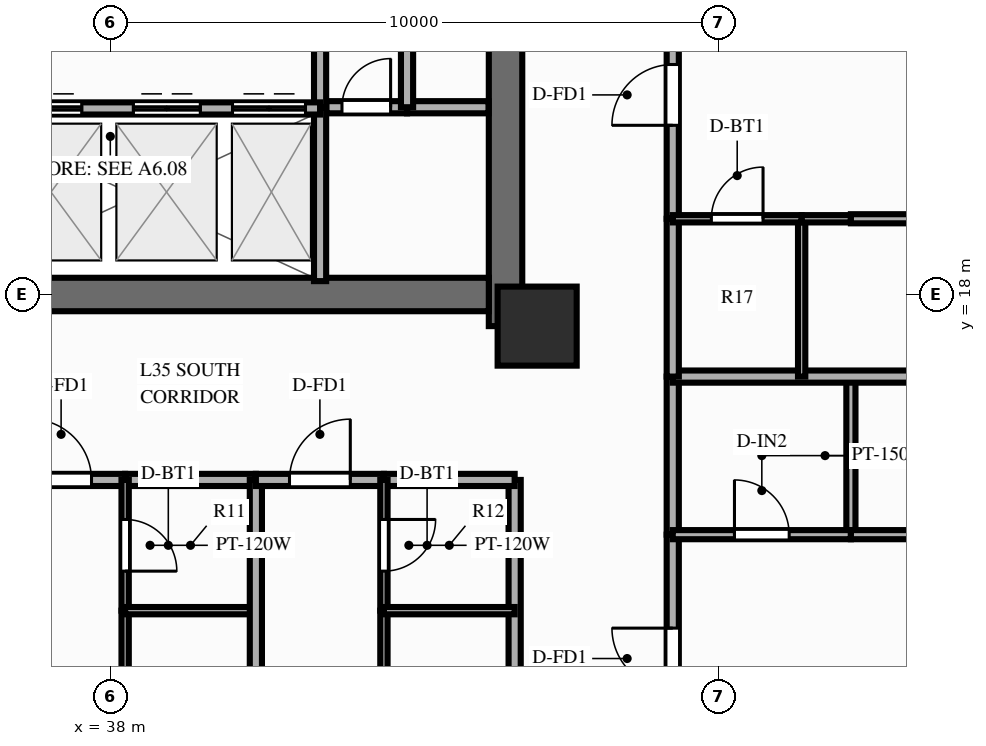
"""IFC4 building model, lengths in metres.
Left out: names, types, materials, properties, quantities, classifications, styles, units other than length and angle.
Written with IfcOpenShell. Run it as: python <this file> out.ifc"""

import sys

from ifc_helpers import new_model, si_unit, direction, frame, frame_2d, origin, origin_2d, place, context, subcontext, project, spatial, rectangle, extrude, source, transform, mapped, element, fill, save


model = new_model("IFC4")
c1 = context("Model", 3, precision=1e-05, world=origin(), true_north=direction((0.0, 1.0)))
c2 = subcontext(c1, "Body", "Model", "MODEL_VIEW")
j1 = project(units=[si_unit("LENGTHUNIT", "METRE"), si_unit("PLANEANGLEUNIT", "RADIAN")], contexts=[c1])
p1 = place(None, origin())
s1 = spatial("IfcSite", under=j1, at=p1, CompositionType="ELEMENT")
p2 = place(p1, origin())
s2 = spatial("IfcBuilding", under=s1, at=p2, CompositionType="ELEMENT")
p3 = place(p2, frame((0.0, 0.0, 110.85)))
s3 = spatial("IfcBuildingStorey", under=s2, at=p3, CompositionType="ELEMENT", Elevation=110.85)
p4 = place(p3, frame((44.5, 17.48, 0.0), z_axis=(0.0, 0.0, 1.0), x_axis=(0.0, 1.0, 0.0)))
e1 = element("IfcWall", 1, at=p4, inside=s3, PredefinedType="SHEAR", context=c2, shape_type="SweptSolid", body=[
    extrude(rectangle(XDim=19.04, YDim=0.55, at=frame_2d((9.52, 0.0))), origin(), (0.0, 0.0, 1.0), 3.0),
])
p5 = place(p4, frame((12.67, 0.0, 0.0), z_axis=(0.0, 0.0, 1.0), x_axis=(-1.0, 0.0, 0.0)))
e2 = element("IfcOpeningElement", 2, at=p5, cuts=e1, PredefinedType="OPENING", context=c2, shape_type="SweptSolid", body=[
    extrude(rectangle(XDim=1.1, YDim=2.15, at=frame_2d((0.55, 1.075))), frame((0.0, 0.287, 0.0), z_axis=(0.0, -1.0, 0.0), x_axis=(1.0, 0.0, 0.0)), (0.0, 0.0, 1.0), 0.574),
])
p6 = place(p3, frame((31.775, 18.0, 0.0), z_axis=(0.0, 0.0, 1.0), x_axis=(1.0, 0.0, 0.0)))
e3 = element("IfcWall", 3, at=p6, inside=s3, PredefinedType="SHEAR", context=c2, shape_type="SweptSolid", body=[
    extrude(rectangle(XDim=12.45, YDim=0.55, at=frame_2d((6.225, 0.0))), origin(), (0.0, 0.0, 1.0), 3.0),
])
m1 = source(origin(), c2, "Body", "SweptSolid", [
    extrude(rectangle(XDim=1.3, YDim=1.3, at=origin_2d()), origin(), (0.0, 0.0, 1.0), 3.0),
])
p7 = place(p3, frame((45.02, 17.48, 0.0), z_axis=(0.0, 0.0, 1.0), x_axis=(1.0, 0.0, 0.0)))
e4 = element("IfcColumn", 4, at=p7, inside=s3, PredefinedType="COLUMN", context=c2, shape_type="MappedRepresentation", body=[
    mapped(m1, transform((0.0, 0.0, 0.0), scale=1.0)),
])
p8 = place(p3, frame((41.55, 21.08, 0.0), z_axis=(0.0, 0.0, 1.0), x_axis=(1.0, 0.0, 0.0)))
e5 = element("IfcWall", 5, at=p8, inside=s3, PredefinedType="PARTITIONING", context=c2, shape_type="SweptSolid", body=[
    extrude(rectangle(XDim=1.33, YDim=0.2, at=frame_2d((0.665, 0.0))), origin(), (0.0, 0.0, 1.0), 2.79),
])
p9 = place(p8, frame((0.26, 0.0, 0.0)))
e6 = element("IfcOpeningElement", 6, at=p9, cuts=e5, PredefinedType="OPENING", context=c2, shape_type="SweptSolid", body=[
    extrude(rectangle(XDim=0.8, YDim=2.05, at=frame_2d((0.4, 1.025))), frame((0.0, 0.112, 0.0), z_axis=(0.0, -1.0, 0.0), x_axis=(1.0, 0.0, 0.0)), (0.0, 0.0, 1.0), 0.224),
])
p10 = place(p3, frame((42.88, 21.08, 0.0), z_axis=(0.0, 0.0, 1.0), x_axis=(1.0, 0.0, 0.0)))
e7 = element("IfcWall", 7, at=p10, inside=s3, PredefinedType="PARTITIONING", context=c2, shape_type="SweptSolid", body=[
    extrude(rectangle(XDim=1.34, YDim=0.2, at=frame_2d((0.67, 0.0))), origin(), (0.0, 0.0, 1.0), 2.79),
])
p11 = place(p3, frame((42.88, 21.08, 0.0), z_axis=(0.0, 0.0, 1.0), x_axis=(0.0, 1.0, 0.0)))
e8 = element("IfcWall", 8, at=p11, inside=s3, PredefinedType="PARTITIONING", context=c2, shape_type="SweptSolid", body=[
    extrude(rectangle(XDim=7.47, YDim=0.2, at=frame_2d((3.735, 0.0))), origin(), (0.0, 0.0, 1.0), 2.79),
])
p12 = place(p11, frame((3.2, 0.0, 0.0)))
e9 = element("IfcOpeningElement", 9, at=p12, cuts=e8, PredefinedType="OPENING", context=c2, shape_type="SweptSolid", body=[
    extrude(rectangle(XDim=0.9, YDim=2.1, at=frame_2d((0.45, 1.05))), frame((0.0, 0.112, 0.0), z_axis=(0.0, -1.0, 0.0), x_axis=(1.0, 0.0, 0.0)), (0.0, 0.0, 1.0), 0.224),
])
p13 = place(p3, frame((41.45, 18.22, 0.0), z_axis=(0.0, 0.0, 1.0), x_axis=(0.0, 1.0, 0.0)))
e10 = element("IfcWall", 10, at=p13, inside=s3, PredefinedType="PARTITIONING", context=c2, shape_type="SweptSolid", body=[
    extrude(rectangle(XDim=2.86, YDim=0.2, at=frame_2d((1.43, 0.0))), origin(), (0.0, 0.0, 1.0), 2.79),
])
p14 = place(p3, frame((41.45, 21.08, 0.0), z_axis=(0.0, 0.0, 1.0), x_axis=(0.0, 1.0, 0.0)))
e11 = element("IfcWall", 11, at=p14, inside=s3, PredefinedType="PARTITIONING", context=c2, shape_type="SweptSolid", body=[
    extrude(rectangle(XDim=7.52, YDim=0.2, at=frame_2d((3.76, 0.0))), origin(), (0.0, 0.0, 1.0), 2.79),
])
p15 = place(p14, frame((2.8, 0.0, 0.0)))
e12 = element("IfcOpeningElement", 12, at=p15, cuts=e11, PredefinedType="OPENING", context=c2, shape_type="SweptSolid", body=[
    extrude(rectangle(XDim=0.9, YDim=2.1, at=frame_2d((0.45, 1.05))), frame((0.0, 0.112, 0.0), z_axis=(0.0, -1.0, 0.0), x_axis=(1.0, 0.0, 0.0)), (0.0, 0.0, 1.0), 0.224),
])
p16 = place(p3, frame((35.43, 21.06, 0.0), z_axis=(0.0, 0.0, 1.0), x_axis=(1.0, 0.0, 0.0)))
e13 = element("IfcWall", 13, at=p16, inside=s3, PredefinedType="PARTITIONING", context=c2, shape_type="SweptSolid", body=[
    extrude(rectangle(XDim=6.02, YDim=0.2, at=frame_2d((3.01, 0.0))), origin(), (0.0, 0.0, 1.0), 2.79),
])
p17 = place(p16, frame((1.0, 0.0, 0.0)))
e14 = element("IfcOpeningElement", 14, at=p17, cuts=e13, PredefinedType="OPENING", context=c2, shape_type="SweptSolid", body=[
    extrude(rectangle(XDim=1.1, YDim=2.15, at=frame_2d((0.55, 1.075))), frame((0.0, 0.112, 0.0), z_axis=(0.0, -1.0, 0.0), x_axis=(1.0, 0.0, 0.0)), (0.0, 0.0, 1.0), 0.224),
])
p18 = place(p16, frame((2.95, 0.0, 0.0)))
e15 = element("IfcOpeningElement", 15, at=p18, cuts=e13, PredefinedType="OPENING", context=c2, shape_type="SweptSolid", body=[
    extrude(rectangle(XDim=1.1, YDim=2.15, at=frame_2d((0.55, 1.075))), frame((0.0, 0.112, 0.0), z_axis=(0.0, -1.0, 0.0), x_axis=(1.0, 0.0, 0.0)), (0.0, 0.0, 1.0), 0.224),
])
p19 = place(p16, frame((4.58, 0.0, 0.0)))
e16 = element("IfcOpeningElement", 16, at=p19, cuts=e13, PredefinedType="OPENING", context=c2, shape_type="SweptSolid", body=[
    extrude(rectangle(XDim=1.2, YDim=2.15, at=frame_2d((0.6, 1.075))), frame((0.0, 0.112, 0.0), z_axis=(0.0, -1.0, 0.0), x_axis=(1.0, 0.0, 0.0)), (0.0, 0.0, 1.0), 0.224),
])
p20 = place(p3, frame((44.65, 14.95, 0.0), z_axis=(0.0, 0.0, 1.0), x_axis=(0.0, -1.0, 0.0)))
e17 = element("IfcWall", 17, at=p20, inside=s3, PredefinedType="PARTITIONING", context=c2, shape_type="SweptSolid", body=[
    extrude(rectangle(XDim=11.8, YDim=0.2, at=frame_2d((5.9, 0.0))), origin(), (0.0, 0.0, 1.0), 2.34),
])
p21 = place(p3, frame((36.138, 14.95, 0.0), z_axis=(0.0, 0.0, 1.0), x_axis=(1.0, 0.0, 0.0)))
e18 = element("IfcWall", 18, at=p21, inside=s3, PredefinedType="PARTITIONING", context=c2, shape_type="SweptSolid", body=[
    extrude(rectangle(XDim=2.106, YDim=0.2, at=frame_2d((1.053, 0.0))), origin(), (0.0, 0.0, 1.0), 2.79),
])
p22 = place(p21, frame((0.553, 0.0, 0.0)))
e19 = element("IfcOpeningElement", 19, at=p22, cuts=e18, PredefinedType="OPENING", context=c2, shape_type="SweptSolid", body=[
    extrude(rectangle(XDim=1.0, YDim=2.15, at=frame_2d((0.5, 1.075))), frame((0.0, 0.112, 0.0), z_axis=(0.0, -1.0, 0.0), x_axis=(1.0, 0.0, 0.0)), (0.0, 0.0, 1.0), 0.224),
])
p23 = place(p3, frame((38.244, 14.95, 0.0), z_axis=(0.0, 0.0, 1.0), x_axis=(1.0, 0.0, 0.0)))
e20 = element("IfcWall", 20, at=p23, inside=s3, PredefinedType="PARTITIONING", context=c2, shape_type="SweptSolid", body=[
    extrude(rectangle(XDim=2.15, YDim=0.2, at=frame_2d((1.075, 0.0))), origin(), (0.0, 0.0, 1.0), 2.79),
])
p24 = place(p3, frame((38.244, 14.95, 0.0), z_axis=(0.0, 0.0, 1.0), x_axis=(0.0, -1.0, 0.0)))
e21 = element("IfcWall", 21, at=p24, inside=s3, PredefinedType="PARTITIONING", context=c2, shape_type="SweptSolid", body=[
    extrude(rectangle(XDim=2.15, YDim=0.12, at=frame_2d((1.075, 0.0))), origin(), (0.0, 0.0, 1.0), 2.79),
])
p25 = place(p24, frame((0.65, 0.0, 0.0)))
e22 = element("IfcOpeningElement", 22, at=p25, cuts=e21, PredefinedType="OPENING", context=c2, shape_type="SweptSolid", body=[
    extrude(rectangle(XDim=0.85, YDim=2.05, at=frame_2d((0.425, 1.025))), frame((0.0, 0.072, 0.0), z_axis=(0.0, -1.0, 0.0), x_axis=(1.0, 0.0, 0.0)), (0.0, 0.0, 1.0), 0.144),
])
p26 = place(p3, frame((38.244, 12.8, 0.0), z_axis=(0.0, 0.0, 1.0), x_axis=(0.0, -1.0, 0.0)))
e23 = element("IfcWall", 23, at=p26, inside=s3, PredefinedType="PARTITIONING", context=c2, shape_type="SweptSolid", body=[
    extrude(rectangle(XDim=1.02, YDim=0.12, at=frame_2d((0.51, 0.0))), origin(), (0.0, 0.0, 1.0), 2.79),
])
p27 = place(p3, frame((38.244, 12.8, 0.0), z_axis=(0.0, 0.0, 1.0), x_axis=(1.0, 0.0, 0.0)))
e24 = element("IfcWall", 24, at=p27, inside=s3, PredefinedType="PARTITIONING", context=c2, shape_type="SweptSolid", body=[
    extrude(rectangle(XDim=2.15, YDim=0.12, at=frame_2d((1.075, 0.0))), origin(), (0.0, 0.0, 1.0), 2.79),
])
p28 = place(p3, frame((40.394, 14.95, 0.0), z_axis=(0.0, 0.0, 1.0), x_axis=(0.0, -1.0, 0.0)))
e25 = element("IfcWall", 25, at=p28, inside=s3, PredefinedType="PARTITIONING", context=c2, shape_type="SweptSolid", body=[
    extrude(rectangle(XDim=11.8, YDim=0.2, at=frame_2d((5.9, 0.0))), origin(), (0.0, 0.0, 1.0), 2.79),
])
p29 = place(p3, frame((40.394, 14.95, 0.0), z_axis=(0.0, 0.0, 1.0), x_axis=(1.0, 0.0, 0.0)))
e26 = element("IfcWall", 26, at=p29, inside=s3, PredefinedType="PARTITIONING", context=c2, shape_type="SweptSolid", body=[
    extrude(rectangle(XDim=2.106, YDim=0.2, at=frame_2d((1.053, 0.0))), origin(), (0.0, 0.0, 1.0), 2.79),
])
p30 = place(p29, frame((0.553, 0.0, 0.0)))
e27 = element("IfcOpeningElement", 27, at=p30, cuts=e26, PredefinedType="OPENING", context=c2, shape_type="SweptSolid", body=[
    extrude(rectangle(XDim=1.0, YDim=2.15, at=frame_2d((0.5, 1.075))), frame((0.0, 0.112, 0.0), z_axis=(0.0, -1.0, 0.0), x_axis=(1.0, 0.0, 0.0)), (0.0, 0.0, 1.0), 0.224),
])
p31 = place(p3, frame((42.5, 14.95, 0.0), z_axis=(0.0, 0.0, 1.0), x_axis=(1.0, 0.0, 0.0)))
e28 = element("IfcWall", 28, at=p31, inside=s3, PredefinedType="PARTITIONING", context=c2, shape_type="SweptSolid", body=[
    extrude(rectangle(XDim=2.15, YDim=0.2, at=frame_2d((1.075, 0.0))), origin(), (0.0, 0.0, 1.0), 2.79),
])
p32 = place(p3, frame((42.5, 14.95, 0.0), z_axis=(0.0, 0.0, 1.0), x_axis=(0.0, -1.0, 0.0)))
e29 = element("IfcWall", 29, at=p32, inside=s3, PredefinedType="PARTITIONING", context=c2, shape_type="SweptSolid", body=[
    extrude(rectangle(XDim=2.15, YDim=0.12, at=frame_2d((1.075, 0.0))), origin(), (0.0, 0.0, 1.0), 2.79),
])
p33 = place(p32, frame((0.65, 0.0, 0.0)))
e30 = element("IfcOpeningElement", 30, at=p33, cuts=e29, PredefinedType="OPENING", context=c2, shape_type="SweptSolid", body=[
    extrude(rectangle(XDim=0.85, YDim=2.05, at=frame_2d((0.425, 1.025))), frame((0.0, 0.072, 0.0), z_axis=(0.0, -1.0, 0.0), x_axis=(1.0, 0.0, 0.0)), (0.0, 0.0, 1.0), 0.144),
])
p34 = place(p3, frame((42.5, 12.8, 0.0), z_axis=(0.0, 0.0, 1.0), x_axis=(0.0, -1.0, 0.0)))
e31 = element("IfcWall", 31, at=p34, inside=s3, PredefinedType="PARTITIONING", context=c2, shape_type="SweptSolid", body=[
    extrude(rectangle(XDim=1.02, YDim=0.12, at=frame_2d((0.51, 0.0))), origin(), (0.0, 0.0, 1.0), 2.79),
])
p35 = place(p3, frame((42.5, 12.8, 0.0), z_axis=(0.0, 0.0, 1.0), x_axis=(1.0, 0.0, 0.0)))
e32 = element("IfcWall", 32, at=p35, inside=s3, PredefinedType="PARTITIONING", context=c2, shape_type="SweptSolid", body=[
    extrude(rectangle(XDim=2.15, YDim=0.12, at=frame_2d((1.075, 0.0))), origin(), (0.0, 0.0, 1.0), 2.79),
])
p36 = place(p3, frame((47.25, 9.976, 0.0), z_axis=(0.0, 0.0, 1.0), x_axis=(0.0, 1.0, 0.0)))
e33 = element("IfcWall", 33, at=p36, inside=s3, PredefinedType="PARTITIONING", context=c2, shape_type="SweptSolid", body=[
    extrude(rectangle(XDim=4.074, YDim=0.2, at=frame_2d((2.037, 0.0))), origin(), (0.0, 0.0, 1.0), 2.79),
])
p37 = place(p36, frame((1.537, 0.0, 0.0)))
e34 = element("IfcOpeningElement", 34, at=p37, cuts=e33, PredefinedType="OPENING", context=c2, shape_type="SweptSolid", body=[
    extrude(rectangle(XDim=1.0, YDim=2.15, at=frame_2d((0.5, 1.075))), frame((0.0, 0.112, 0.0), z_axis=(0.0, -1.0, 0.0), x_axis=(1.0, 0.0, 0.0)), (0.0, 0.0, 1.0), 0.224),
])
p38 = place(p3, frame((47.25, 14.05, 0.0), z_axis=(0.0, 0.0, 1.0), x_axis=(0.0, 1.0, 0.0)))
e35 = element("IfcWall", 35, at=p38, inside=s3, PredefinedType="PARTITIONING", context=c2, shape_type="SweptSolid", body=[
    extrude(rectangle(XDim=2.6, YDim=0.2, at=frame_2d((1.3, 0.0))), origin(), (0.0, 0.0, 1.0), 2.79),
])
p39 = place(p3, frame((50.18, 14.05, 0.0), z_axis=(0.0, 0.0, 1.0), x_axis=(0.0, 1.0, 0.0)))
e36 = element("IfcWall", 36, at=p39, inside=s3, PredefinedType="PARTITIONING", context=c2, shape_type="SweptSolid", body=[
    extrude(rectangle(XDim=2.6, YDim=0.15, at=frame_2d((1.3, 0.0))), origin(), (0.0, 0.0, 1.0), 2.79),
])
p40 = place(p3, frame((47.25, 14.05, 0.0), z_axis=(0.0, 0.0, 1.0), x_axis=(1.0, 0.0, 0.0)))
e37 = element("IfcWall", 37, at=p40, inside=s3, PredefinedType="PARTITIONING", context=c2, shape_type="SweptSolid", body=[
    extrude(rectangle(XDim=2.93, YDim=0.15, at=frame_2d((1.465, 0.0))), origin(), (0.0, 0.0, 1.0), 2.79),
])
p41 = place(p40, frame((1.015, 0.0, 0.0)))
e38 = element("IfcOpeningElement", 38, at=p41, cuts=e37, PredefinedType="OPENING", context=c2, shape_type="SweptSolid", body=[
    extrude(rectangle(XDim=0.9, YDim=2.1, at=frame_2d((0.45, 1.05))), frame((0.0, 0.087, 0.0), z_axis=(0.0, -1.0, 0.0), x_axis=(1.0, 0.0, 0.0)), (0.0, 0.0, 1.0), 0.174),
])
p42 = place(p3, frame((50.18, 14.05, 0.0), z_axis=(0.0, 0.0, 1.0), x_axis=(1.0, 0.0, 0.0)))
e39 = element("IfcWall", 39, at=p42, inside=s3, PredefinedType="PARTITIONING", context=c2, shape_type="SweptSolid", body=[
    extrude(rectangle(XDim=13.67, YDim=0.15, at=frame_2d((6.835, 0.0))), origin(), (0.0, 0.0, 1.0), 2.79),
])
p43 = place(p42, frame((5.873, 0.0, 0.0)))
e40 = element("IfcOpeningElement", 40, at=p43, cuts=e39, PredefinedType="OPENING", context=c2, shape_type="SweptSolid", body=[
    extrude(rectangle(XDim=0.9, YDim=2.1, at=frame_2d((0.45, 1.05))), frame((0.0, 0.087, 0.0), z_axis=(0.0, -1.0, 0.0), x_axis=(1.0, 0.0, 0.0)), (0.0, 0.0, 1.0), 0.174),
])
p44 = place(p3, frame((47.25, 16.65, 0.0), z_axis=(0.0, 0.0, 1.0), x_axis=(1.0, 0.0, 0.0)))
e41 = element("IfcWall", 41, at=p44, inside=s3, PredefinedType="PARTITIONING", context=c2, shape_type="SweptSolid", body=[
    extrude(rectangle(XDim=16.6, YDim=0.2, at=frame_2d((8.3, 0.0))), origin(), (0.0, 0.0, 1.0), 2.79),
])
p45 = place(p3, frame((47.25, 16.65, 0.0), z_axis=(0.0, 0.0, 1.0), x_axis=(0.0, 1.0, 0.0)))
e42 = element("IfcWall", 42, at=p45, inside=s3, PredefinedType="PARTITIONING", context=c2, shape_type="SweptSolid", body=[
    extrude(rectangle(XDim=2.596, YDim=0.2, at=frame_2d((1.298, 0.0))), origin(), (0.0, 0.0, 1.0), 2.79),
])
p46 = place(p3, frame((47.25, 19.246, 0.0), z_axis=(0.0, 0.0, 1.0), x_axis=(0.0, 1.0, 0.0)))
e43 = element("IfcWall", 43, at=p46, inside=s3, PredefinedType="PARTITIONING", context=c2, shape_type="SweptSolid", body=[
    extrude(rectangle(XDim=4.074, YDim=0.2, at=frame_2d((2.037, 0.0))), origin(), (0.0, 0.0, 1.0), 2.79),
])
p47 = place(p46, frame((1.537, 0.0, 0.0)))
e44 = element("IfcOpeningElement", 44, at=p47, cuts=e43, PredefinedType="OPENING", context=c2, shape_type="SweptSolid", body=[
    extrude(rectangle(XDim=1.0, YDim=2.15, at=frame_2d((0.5, 1.075))), frame((0.0, 0.112, 0.0), z_axis=(0.0, -1.0, 0.0), x_axis=(1.0, 0.0, 0.0)), (0.0, 0.0, 1.0), 0.224),
])
p48 = place(p3, frame((49.37, 16.65, 0.0), z_axis=(0.0, 0.0, 1.0), x_axis=(0.0, 1.0, 0.0)))
e45 = element("IfcWall", 45, at=p48, inside=s3, PredefinedType="PARTITIONING", context=c2, shape_type="SweptSolid", body=[
    extrude(rectangle(XDim=2.596, YDim=0.12, at=frame_2d((1.298, 0.0))), origin(), (0.0, 0.0, 1.0), 2.79),
])
p49 = place(p3, frame((47.25, 19.246, 0.0), z_axis=(0.0, 0.0, 1.0), x_axis=(1.0, 0.0, 0.0)))
e46 = element("IfcWall", 46, at=p49, inside=s3, PredefinedType="PARTITIONING", context=c2, shape_type="SweptSolid", body=[
    extrude(rectangle(XDim=2.12, YDim=0.12, at=frame_2d((1.06, 0.0))), origin(), (0.0, 0.0, 1.0), 2.79),
])
p50 = place(p49, frame((0.635, 0.0, 0.0)))
e47 = element("IfcOpeningElement", 47, at=p50, cuts=e46, PredefinedType="OPENING", context=c2, shape_type="SweptSolid", body=[
    extrude(rectangle(XDim=0.85, YDim=2.05, at=frame_2d((0.425, 1.025))), frame((0.0, 0.072, 0.0), z_axis=(0.0, -1.0, 0.0), x_axis=(1.0, 0.0, 0.0)), (0.0, 0.0, 1.0), 0.144),
])
p51 = place(p3, frame((49.37, 19.246, 0.0), z_axis=(0.0, 0.0, 1.0), x_axis=(1.0, 0.0, 0.0)))
e48 = element("IfcWall", 48, at=p51, inside=s3, PredefinedType="PARTITIONING", context=c2, shape_type="SweptSolid", body=[
    extrude(rectangle(XDim=0.81, YDim=0.12, at=frame_2d((0.405, 0.0))), origin(), (0.0, 0.0, 1.0), 2.79),
])
p52 = place(p3, frame((50.18, 19.246, 0.0), z_axis=(0.0, 0.0, 1.0), x_axis=(1.0, 0.0, 0.0)))
e49 = element("IfcWall", 49, at=p52, inside=s3, PredefinedType="PARTITIONING", context=c2, shape_type="SweptSolid", body=[
    extrude(rectangle(XDim=13.67, YDim=0.15, at=frame_2d((6.835, 0.0))), origin(), (0.0, 0.0, 1.0), 2.79),
])
p53 = place(p52, frame((5.873, 0.0, 0.0)))
e50 = element("IfcOpeningElement", 50, at=p53, cuts=e49, PredefinedType="OPENING", context=c2, shape_type="SweptSolid", body=[
    extrude(rectangle(XDim=0.9, YDim=2.1, at=frame_2d((0.45, 1.05))), frame((0.0, 0.087, 0.0), z_axis=(0.0, -1.0, 0.0), x_axis=(1.0, 0.0, 0.0)), (0.0, 0.0, 1.0), 0.174),
])
m2 = source(origin(), c2, "Body", "SweptSolid", [
    extrude(rectangle(XDim=0.8, YDim=2.05, at=frame_2d((0.4, 1.025))), frame((0.0, 0.025, 0.0), z_axis=(0.0, -1.0, 0.0), x_axis=(1.0, 0.0, 0.0)), (0.0, 0.0, 1.0), 0.05),
])
p54 = place(p9, origin())
e51 = element("IfcDoor", 51, at=p54, inside=s3, OperationType="SINGLE_SWING_RIGHT", PredefinedType="DOOR", context=c2, shape_type="MappedRepresentation", body=[
    mapped(m2, transform((0.0, 0.0, 0.0), scale=1.0)),
])
fill(e6, e51)
m3 = source(origin(), c2, "Body", "SweptSolid", [
    extrude(rectangle(XDim=1.1, YDim=2.15, at=frame_2d((0.55, 1.075))), frame((0.0, 0.025, 0.0), z_axis=(0.0, -1.0, 0.0), x_axis=(1.0, 0.0, 0.0)), (0.0, 0.0, 1.0), 0.05),
])
p55 = place(p17, origin())
e52 = element("IfcDoor", 52, at=p55, inside=s3, OperationType="DOUBLE_DOOR_SLIDING", PredefinedType="DOOR", context=c2, shape_type="MappedRepresentation", body=[
    mapped(m3, transform((0.0, 0.0, 0.0), scale=1.0)),
])
fill(e14, e52)
p56 = place(p18, origin())
e53 = element("IfcDoor", 53, at=p56, inside=s3, OperationType="DOUBLE_DOOR_SLIDING", PredefinedType="DOOR", context=c2, shape_type="MappedRepresentation", body=[
    mapped(m3, transform((0.0, 0.0, 0.0), scale=1.0)),
])
fill(e15, e53)
m4 = source(origin(), c2, "Body", "SweptSolid", [
    extrude(rectangle(XDim=1.2, YDim=2.15, at=frame_2d((0.6, 1.075))), frame((0.0, 0.025, 0.0), z_axis=(0.0, -1.0, 0.0), x_axis=(1.0, 0.0, 0.0)), (0.0, 0.0, 1.0), 0.05),
])
p57 = place(p19, origin())
e54 = element("IfcDoor", 54, at=p57, inside=s3, OperationType="DOUBLE_DOOR_SLIDING", PredefinedType="DOOR", context=c2, shape_type="MappedRepresentation", body=[
    mapped(m4, transform((0.0, 0.0, 0.0), scale=1.0)),
])
fill(e16, e54)
m5 = source(origin(), c2, "Body", "SweptSolid", [
    extrude(rectangle(XDim=1.0, YDim=2.15, at=frame_2d((0.5, 1.075))), frame((0.0, 0.025, 0.0), z_axis=(0.0, -1.0, 0.0), x_axis=(1.0, 0.0, 0.0)), (0.0, 0.0, 1.0), 0.05),
])
p58 = place(p22, origin())
e55 = element("IfcDoor", 55, at=p58, inside=s3, OperationType="SINGLE_SWING_LEFT", PredefinedType="DOOR", context=c2, shape_type="MappedRepresentation", body=[
    mapped(m5, transform((0.0, 0.0, 0.0), scale=1.0)),
])
fill(e19, e55)
m6 = source(origin(), c2, "Body", "SweptSolid", [
    extrude(rectangle(XDim=0.85, YDim=2.05, at=frame_2d((0.425, 1.025))), frame((0.0, 0.025, 0.0), z_axis=(0.0, -1.0, 0.0), x_axis=(1.0, 0.0, 0.0)), (0.0, 0.0, 1.0), 0.05),
])
p59 = place(p25, origin())
e56 = element("IfcDoor", 56, at=p59, inside=s3, OperationType="SINGLE_SWING_RIGHT", PredefinedType="DOOR", context=c2, shape_type="MappedRepresentation", body=[
    mapped(m6, transform((0.0, 0.0, 0.0), scale=1.0)),
])
fill(e22, e56)
p60 = place(p30, origin())
e57 = element("IfcDoor", 57, at=p60, inside=s3, OperationType="SINGLE_SWING_RIGHT", PredefinedType="DOOR", context=c2, shape_type="MappedRepresentation", body=[
    mapped(m5, transform((0.0, 0.0, 0.0), scale=1.0)),
])
fill(e27, e57)
p61 = place(p33, origin())
e58 = element("IfcDoor", 58, at=p61, inside=s3, OperationType="SINGLE_SWING_LEFT", PredefinedType="DOOR", context=c2, shape_type="MappedRepresentation", body=[
    mapped(m6, transform((0.0, 0.0, 0.0), scale=1.0)),
])
fill(e30, e58)
p62 = place(p37, origin())
e59 = element("IfcDoor", 59, at=p62, inside=s3, OperationType="SINGLE_SWING_RIGHT", PredefinedType="DOOR", context=c2, shape_type="MappedRepresentation", body=[
    mapped(m5, transform((0.0, 0.0, 0.0), scale=1.0)),
])
fill(e34, e59)
m7 = source(origin(), c2, "Body", "SweptSolid", [
    extrude(rectangle(XDim=0.9, YDim=2.1, at=frame_2d((0.45, 1.05))), frame((0.0, 0.025, 0.0), z_axis=(0.0, -1.0, 0.0), x_axis=(1.0, 0.0, 0.0)), (0.0, 0.0, 1.0), 0.05),
])
p63 = place(p41, origin())
e60 = element("IfcDoor", 60, at=p63, inside=s3, OperationType="SINGLE_SWING_LEFT", PredefinedType="DOOR", context=c2, shape_type="MappedRepresentation", body=[
    mapped(m7, transform((0.0, 0.0, 0.0), scale=1.0)),
])
fill(e38, e60)
p64 = place(p47, origin())
e61 = element("IfcDoor", 61, at=p64, inside=s3, OperationType="SINGLE_SWING_LEFT", PredefinedType="DOOR", context=c2, shape_type="MappedRepresentation", body=[
    mapped(m5, transform((0.0, 0.0, 0.0), scale=1.0)),
])
fill(e44, e61)
p65 = place(p50, origin())
e62 = element("IfcDoor", 62, at=p65, inside=s3, OperationType="SINGLE_SWING_RIGHT", PredefinedType="DOOR", context=c2, shape_type="MappedRepresentation", body=[
    mapped(m6, transform((0.0, 0.0, 0.0), scale=1.0)),
])
fill(e47, e62)
save(model, sys.argv[1])
